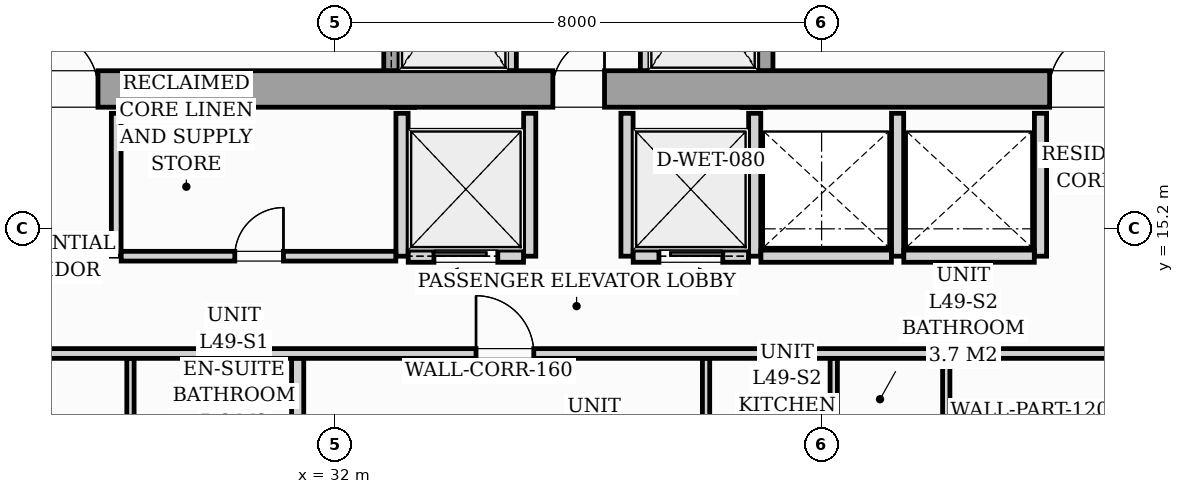
"""IFC4 building model, lengths in metres.
Left out: names, types, materials, properties, quantities, classifications, styles, units other than length and angle.
Written with IfcOpenShell. Run it as: python <this file> out.ifc"""

import sys

from ifc_helpers import new_model, si_unit, direction, frame, frame_2d, origin, origin_2d, place, context, subcontext, project, spatial, rectangle, i_section, extrude, source, transform, mapped, element, fill, save


model = new_model("IFC4")
c1 = context("Model", 3, precision=1e-05, world=origin(), true_north=direction((0.0, 1.0)))
c2 = subcontext(c1, "Body", "Model", "MODEL_VIEW")
j1 = project(units=[si_unit("LENGTHUNIT", "METRE"), si_unit("PLANEANGLEUNIT", "RADIAN")], contexts=[c1])
p1 = place(None, origin())
s1 = spatial("IfcSite", under=j1, at=p1, CompositionType="ELEMENT")
p2 = place(p1, origin())
s2 = spatial("IfcBuilding", under=s1, at=p2, CompositionType="ELEMENT")
p3 = place(p2, frame((0.0, 0.0, 173.0)))
s3 = spatial("IfcBuildingStorey", under=s2, at=p3, CompositionType="ELEMENT", Elevation=173.0)
m1 = source(origin(), c2, "Body", "SweptSolid", [
    extrude(i_section(OverallWidth=0.416, OverallDepth=0.446, WebThickness=0.039, FlangeThickness=0.063, FilletRadius=0.018, at=origin_2d()), origin(), (0.0, 0.0, 1.0), 3.196),
])
for number, where, z_axis, x_axis in (
    (1, (33.12, 17.4, 0.002), (0.0, 0.0, 1.0), (1.0, 0.0, 0.0)),
    (2, (38.88, 17.4, 0.002), (0.0, 0.0, 1.0), (1.0, 0.0, 0.0)),
):
    element("IfcColumn", number, at=place(p3, frame(where, z_axis=z_axis, x_axis=x_axis)), inside=s3, PredefinedType="PILASTER", context=c2, shape_type="MappedRepresentation", body=[
        mapped(m1, transform((0.0, 0.0, 0.0), scale=1.0)),
    ])
p4 = place(p3, frame((26.2, 17.5, 0.0), z_axis=(0.0, 0.0, 1.0), x_axis=(1.0, 0.0, 0.0)))
e3 = element("IfcWall", 3, at=p4, inside=s3, PredefinedType="SHEAR", context=c2, shape_type="SweptSolid", body=[
    extrude(rectangle(XDim=19.6, YDim=0.6, at=frame_2d((9.8, 0.0))), origin(), (0.0, 0.0, 1.0), 3.2),
])
p5 = place(p4, frame((0.95, 0.0, 0.0)))
e4 = element("IfcOpeningElement", 4, at=p5, cuts=e3, PredefinedType="OPENING", context=c2, shape_type="SweptSolid", body=[
    extrude(rectangle(XDim=0.95, YDim=2.06, at=frame_2d((0.475, 1.03))), frame((0.0, 0.31, 0.0), z_axis=(0.0, -1.0, 0.0), x_axis=(1.0, 0.0, 0.0)), (0.0, 0.0, 1.0), 0.62),
])
p6 = place(p4, frame((9.38, 0.0, 0.0)))
e5 = element("IfcOpeningElement", 5, at=p6, cuts=e3, PredefinedType="OPENING", context=c2, shape_type="SweptSolid", body=[
    extrude(rectangle(XDim=0.85, YDim=2.0, at=frame_2d((0.425, 1.0))), frame((0.0, 0.31, 0.0), z_axis=(0.0, -1.0, 0.0), x_axis=(1.0, 0.0, 0.0)), (0.0, 0.0, 1.0), 0.62),
])
p7 = place(p4, frame((17.55, 0.0, 0.0)))
e6 = element("IfcOpeningElement", 6, at=p7, cuts=e3, PredefinedType="OPENING", context=c2, shape_type="SweptSolid", body=[
    extrude(rectangle(XDim=0.95, YDim=2.06, at=frame_2d((0.475, 1.03))), frame((0.0, 0.31, 0.0), z_axis=(0.0, -1.0, 0.0), x_axis=(1.0, 0.0, 0.0)), (0.0, 0.0, 1.0), 0.62),
])
p8 = place(p3, frame((32.925, 17.802, 0.0), z_axis=(0.0, 0.0, 1.0), x_axis=(0.0, 1.0, 0.0)))
e7 = element("IfcWall", 7, at=p8, inside=s3, PredefinedType="SOLIDWALL", context=c2, shape_type="SweptSolid", body=[
    extrude(rectangle(XDim=2.646, YDim=0.25, at=frame_2d((1.323, 0.0))), origin(), (0.0, 0.0, 1.0), 3.2),
])
p9 = place(p8, frame((0.548, 0.0, 0.0)))
e8 = element("IfcOpeningElement", 8, at=p9, cuts=e7, PredefinedType="OPENING", context=c2, shape_type="SweptSolid", body=[
    extrude(rectangle(XDim=1.1, YDim=2.08, at=frame_2d((0.55, 1.04))), frame((0.0, 0.135, 0.0), z_axis=(0.0, -1.0, 0.0), x_axis=(1.0, 0.0, 0.0)), (0.0, 0.0, 1.0), 0.27),
])
for number, where, z_axis, x_axis in (
    (9, (34.9, 17.802, 0.0), (0.0, 0.0, 1.0), (0.0, 1.0, 0.0)),
    (10, (37.1, 17.802, 0.0), (0.0, 0.0, 1.0), (0.0, 1.0, 0.0)),
):
    element("IfcWall", number, at=place(p3, frame(where, z_axis=z_axis, x_axis=x_axis)), inside=s3, PredefinedType="PARTITIONING", context=c2, shape_type="SweptSolid", body=[
        extrude(rectangle(XDim=2.646, YDim=0.16, at=frame_2d((1.323, 0.0))), origin(), (0.0, 0.0, 1.0), 2.94),
    ])
p10 = place(p3, frame((39.075, 17.802, 0.0), z_axis=(0.0, 0.0, 1.0), x_axis=(0.0, 1.0, 0.0)))
e11 = element("IfcWall", 11, at=p10, inside=s3, PredefinedType="SOLIDWALL", context=c2, shape_type="SweptSolid", body=[
    extrude(rectangle(XDim=2.646, YDim=0.25, at=frame_2d((1.323, 0.0))), origin(), (0.0, 0.0, 1.0), 3.2),
])
p11 = place(p10, frame((0.548, 0.0, 0.0)))
e12 = element("IfcOpeningElement", 12, at=p11, cuts=e11, PredefinedType="OPENING", context=c2, shape_type="SweptSolid", body=[
    extrude(rectangle(XDim=1.1, YDim=2.08, at=frame_2d((0.55, 1.04))), frame((0.0, 0.135, 0.0), z_axis=(0.0, -1.0, 0.0), x_axis=(1.0, 0.0, 0.0)), (0.0, 0.0, 1.0), 0.27),
])
p12 = place(p3, frame((28.4, 14.75, 0.0), z_axis=(0.0, 0.0, 1.0), x_axis=(0.0, 1.0, 0.0)))
e13 = element("IfcWall", 13, at=p12, inside=s3, PredefinedType="PARTITIONING", context=c2, shape_type="SweptSolid", body=[
    extrude(rectangle(XDim=2.35, YDim=0.16, at=frame_2d((1.175, 0.0))), origin(), (0.0, 0.0, 1.0), 2.94),
])
p13 = place(p3, frame((33.1, 14.75, 0.0), z_axis=(0.0, 0.0, 1.0), x_axis=(0.0, 1.0, 0.0)))
e14 = element("IfcWall", 14, at=p13, inside=s3, PredefinedType="PARTITIONING", context=c2, shape_type="SweptSolid", body=[
    extrude(rectangle(XDim=2.35, YDim=0.2, at=frame_2d((1.175, 0.0))), origin(), (0.0, 0.0, 1.0), 2.94),
])
p14 = place(p3, frame((28.482, 14.75, 0.0), z_axis=(0.0, 0.0, 1.0), x_axis=(1.0, 0.0, 0.0)))
e15 = element("IfcWall", 15, at=p14, inside=s3, PredefinedType="PARTITIONING", context=c2, shape_type="SweptSolid", body=[
    extrude(rectangle(XDim=4.516, YDim=0.16, at=frame_2d((2.258, 0.0))), origin(), (0.0, 0.0, 1.0), 2.94),
])
p15 = place(p14, frame((1.868, 0.0, 0.0)))
e16 = element("IfcOpeningElement", 16, at=p15, cuts=e15, PredefinedType="OPENING", context=c2, shape_type="SweptSolid", body=[
    extrude(rectangle(XDim=0.8, YDim=2.05, at=frame_2d((0.4, 1.025))), frame((0.0, 0.09, 0.0), z_axis=(0.0, -1.0, 0.0), x_axis=(1.0, 0.0, 0.0)), (0.0, 0.0, 1.0), 0.18),
])
p16 = place(p3, frame((35.2, 14.75, 0.0), z_axis=(0.0, 0.0, 1.0), x_axis=(0.0, 1.0, 0.0)))
e17 = element("IfcWall", 17, at=p16, inside=s3, PredefinedType="PARTITIONING", context=c2, shape_type="SweptSolid", body=[
    extrude(rectangle(XDim=2.35, YDim=0.2, at=frame_2d((1.175, 0.0))), origin(), (0.0, 0.0, 1.0), 2.94),
])
p17 = place(p3, frame((33.202, 14.75, 0.0), z_axis=(0.0, 0.0, 1.0), x_axis=(1.0, 0.0, 0.0)))
e18 = element("IfcWall", 18, at=p17, inside=s3, PredefinedType="PARTITIONING", context=c2, shape_type="SweptSolid", body=[
    extrude(rectangle(XDim=1.896, YDim=0.2, at=frame_2d((0.948, 0.0))), origin(), (0.0, 0.0, 1.0), 2.94),
])
p18 = place(p17, frame((0.423, 0.0, 0.0)))
e19 = element("IfcOpeningElement", 19, at=p18, cuts=e18, PredefinedType="OPENING", context=c2, shape_type="SweptSolid", body=[
    extrude(rectangle(XDim=1.05, YDim=2.08, at=frame_2d((0.525, 1.04))), frame((0.0, 0.11, 0.0), z_axis=(0.0, -1.0, 0.0), x_axis=(1.0, 0.0, 0.0)), (0.0, 0.0, 1.0), 0.22),
])
for number, where, z_axis, x_axis in (
    (20, (36.8, 14.75, 0.0), (0.0, 0.0, 1.0), (0.0, 1.0, 0.0)),
    (21, (38.9, 14.75, 0.0), (0.0, 0.0, 1.0), (0.0, 1.0, 0.0)),
):
    element("IfcWall", number, at=place(p3, frame(where, z_axis=z_axis, x_axis=x_axis)), inside=s3, PredefinedType="PARTITIONING", context=c2, shape_type="SweptSolid", body=[
        extrude(rectangle(XDim=2.35, YDim=0.2, at=frame_2d((1.175, 0.0))), origin(), (0.0, 0.0, 1.0), 2.94),
    ])
p19 = place(p3, frame((36.902, 14.75, 0.0), z_axis=(0.0, 0.0, 1.0), x_axis=(1.0, 0.0, 0.0)))
e22 = element("IfcWall", 22, at=p19, inside=s3, PredefinedType="PARTITIONING", context=c2, shape_type="SweptSolid", body=[
    extrude(rectangle(XDim=1.896, YDim=0.2, at=frame_2d((0.948, 0.0))), origin(), (0.0, 0.0, 1.0), 2.94),
])
p20 = place(p19, frame((0.423, 0.0, 0.0)))
e23 = element("IfcOpeningElement", 23, at=p20, cuts=e22, PredefinedType="OPENING", context=c2, shape_type="SweptSolid", body=[
    extrude(rectangle(XDim=1.05, YDim=2.08, at=frame_2d((0.525, 1.04))), frame((0.0, 0.11, 0.0), z_axis=(0.0, -1.0, 0.0), x_axis=(1.0, 0.0, 0.0)), (0.0, 0.0, 1.0), 0.22),
])
for number, where, z_axis, x_axis in (
    (24, (41.25, 14.75, 0.0), (0.0, 0.0, 1.0), (0.0, 1.0, 0.0)),
    (25, (43.6, 14.75, 0.0), (0.0, 0.0, 1.0), (0.0, 1.0, 0.0)),
):
    element("IfcWall", number, at=place(p3, frame(where, z_axis=z_axis, x_axis=x_axis)), inside=s3, PredefinedType="PARTITIONING", context=c2, shape_type="SweptSolid", body=[
        extrude(rectangle(XDim=2.35, YDim=0.2, at=frame_2d((1.175, 0.0))), origin(), (0.0, 0.0, 1.0), 2.94),
    ])
for number, where, z_axis, x_axis in (
    (26, (39.002, 14.75, 0.0), (0.0, 0.0, 1.0), (1.0, 0.0, 0.0)),
    (27, (41.352, 14.75, 0.0), (0.0, 0.0, 1.0), (1.0, 0.0, 0.0)),
):
    element("IfcWall", number, at=place(p3, frame(where, z_axis=z_axis, x_axis=x_axis)), inside=s3, PredefinedType="PARTITIONING", context=c2, shape_type="SweptSolid", body=[
        extrude(rectangle(XDim=2.146, YDim=0.2, at=frame_2d((1.073, 0.0))), origin(), (0.0, 0.0, 1.0), 2.94),
    ])
p21 = place(p3, frame((22.6, 13.15, 0.0), z_axis=(0.0, 0.0, 1.0), x_axis=(1.0, 0.0, 0.0)))
e28 = element("IfcWall", 28, at=p21, inside=s3, PredefinedType="PARTITIONING", context=c2, shape_type="SweptSolid", body=[
    extrude(rectangle(XDim=23.28, YDim=0.16, at=frame_2d((11.64, 0.0))), origin(), (0.0, 0.0, 1.0), 2.94),
])
p22 = place(p21, frame((0.607, 0.0, 0.0)))
e29 = element("IfcOpeningElement", 29, at=p22, cuts=e28, PredefinedType="OPENING", context=c2, shape_type="SweptSolid", body=[
    extrude(rectangle(XDim=0.95, YDim=2.06, at=frame_2d((0.475, 1.03))), frame((0.0, 0.09, 0.0), z_axis=(0.0, -1.0, 0.0), x_axis=(1.0, 0.0, 0.0)), (0.0, 0.0, 1.0), 0.18),
])
p23 = place(p21, frame((11.717, 0.0, 0.0)))
e30 = element("IfcOpeningElement", 30, at=p23, cuts=e28, PredefinedType="OPENING", context=c2, shape_type="SweptSolid", body=[
    extrude(rectangle(XDim=0.95, YDim=2.06, at=frame_2d((0.475, 1.03))), frame((0.0, 0.09, 0.0), z_axis=(0.0, -1.0, 0.0), x_axis=(1.0, 0.0, 0.0)), (0.0, 0.0, 1.0), 0.18),
])
p24 = place(p3, frame((28.634, 7.503, 0.0), z_axis=(0.0, 0.0, 1.0), x_axis=(0.0, 1.0, 0.0)))
e31 = element("IfcWall", 31, at=p24, inside=s3, PredefinedType="PARTITIONING", context=c2, shape_type="SweptSolid", body=[
    extrude(rectangle(XDim=5.565, YDim=0.12, at=frame_2d((2.782, 0.0))), origin(), (0.0, 0.0, 1.0), 2.94),
])
p25 = place(p24, frame((2.297, 0.0, 0.0)))
e32 = element("IfcOpeningElement", 32, at=p25, cuts=e31, PredefinedType="OPENING", context=c2, shape_type="SweptSolid", body=[
    extrude(rectangle(XDim=0.9, YDim=2.05, at=frame_2d((0.45, 1.025))), frame((0.0, 0.07, 0.0), z_axis=(0.0, -1.0, 0.0), x_axis=(1.0, 0.0, 0.0)), (0.0, 0.0, 1.0), 0.14),
])
p26 = place(p3, frame((31.384, 10.912, 0.0), z_axis=(0.0, 0.0, 1.0), x_axis=(0.0, 1.0, 0.0)))
e33 = element("IfcWall", 33, at=p26, inside=s3, PredefinedType="PARTITIONING", context=c2, shape_type="SweptSolid", body=[
    extrude(rectangle(XDim=2.156, YDim=0.2, at=frame_2d((1.078, 0.0))), origin(), (0.0, 0.0, 1.0), 2.94),
])
p27 = place(p3, frame((42.05, 8.612, 0.0), z_axis=(0.0, 0.0, 1.0), x_axis=(0.0, 1.0, 0.0)))
e34 = element("IfcWall", 34, at=p27, inside=s3, PredefinedType="PARTITIONING", context=c2, shape_type="SweptSolid", body=[
    extrude(rectangle(XDim=4.456, YDim=0.12, at=frame_2d((2.228, 0.0))), origin(), (0.0, 0.0, 1.0), 2.94),
])
p28 = place(p27, frame((2.386, 0.0, 0.0)))
e35 = element("IfcOpeningElement", 35, at=p28, cuts=e34, PredefinedType="OPENING", context=c2, shape_type="SweptSolid", body=[
    extrude(rectangle(XDim=0.9, YDim=2.05, at=frame_2d((0.45, 1.025))), frame((0.0, 0.07, 0.0), z_axis=(0.0, -1.0, 0.0), x_axis=(1.0, 0.0, 0.0)), (0.0, 0.0, 1.0), 0.14),
])
for number, where, z_axis, x_axis in (
    (36, (40.2, 10.962, 0.0), (0.0, 0.0, 1.0), (0.0, 1.0, 0.0)),
    (37, (38.1, 10.962, 0.0), (0.0, 0.0, 1.0), (0.0, 1.0, 0.0)),
):
    element("IfcWall", number, at=place(p3, frame(where, z_axis=z_axis, x_axis=x_axis)), inside=s3, PredefinedType="PARTITIONING", context=c2, shape_type="SweptSolid", body=[
        extrude(rectangle(XDim=2.106, YDim=0.12, at=frame_2d((1.053, 0.0))), origin(), (0.0, 0.0, 1.0), 2.94),
    ])
m2 = source(origin(), c2, "Body", "SweptSolid", [
    extrude(rectangle(XDim=0.95, YDim=2.06, at=frame_2d((0.475, 1.03))), frame((0.0, 0.025, 0.0), z_axis=(0.0, -1.0, 0.0), x_axis=(1.0, 0.0, 0.0)), (0.0, 0.0, 1.0), 0.05),
])
p29 = place(p5, origin())
e38 = element("IfcDoor", 38, at=p29, inside=s3, OperationType="SINGLE_SWING_LEFT", PredefinedType="DOOR", context=c2, shape_type="MappedRepresentation", body=[
    mapped(m2, transform((0.0, 0.0, 0.0), scale=1.0)),
])
fill(e4, e38)
m3 = source(origin(), c2, "Body", "SweptSolid", [
    extrude(rectangle(XDim=0.85, YDim=2.0, at=frame_2d((0.425, 1.0))), frame((0.0, 0.025, 0.0), z_axis=(0.0, -1.0, 0.0), x_axis=(1.0, 0.0, 0.0)), (0.0, 0.0, 1.0), 0.05),
])
p30 = place(p6, origin())
e39 = element("IfcDoor", 39, at=p30, inside=s3, OperationType="SINGLE_SWING_RIGHT", PredefinedType="DOOR", context=c2, shape_type="MappedRepresentation", body=[
    mapped(m3, transform((0.0, 0.0, 0.0), scale=1.0)),
])
fill(e5, e39)
p31 = place(p7, origin())
e40 = element("IfcDoor", 40, at=p31, inside=s3, OperationType="SINGLE_SWING_RIGHT", PredefinedType="DOOR", context=c2, shape_type="MappedRepresentation", body=[
    mapped(m2, transform((0.0, 0.0, 0.0), scale=1.0)),
])
fill(e6, e40)
m4 = source(origin(), c2, "Body", "SweptSolid", [
    extrude(rectangle(XDim=0.8, YDim=2.05, at=frame_2d((0.4, 1.025))), frame((0.0, 0.025, 0.0), z_axis=(0.0, -1.0, 0.0), x_axis=(1.0, 0.0, 0.0)), (0.0, 0.0, 1.0), 0.05),
])
p32 = place(p15, origin())
e41 = element("IfcDoor", 41, at=p32, inside=s3, OperationType="SINGLE_SWING_RIGHT", PredefinedType="DOOR", context=c2, shape_type="MappedRepresentation", body=[
    mapped(m4, transform((0.0, 0.0, 0.0), scale=1.0)),
])
fill(e16, e41)
m5 = source(origin(), c2, "Body", "SweptSolid", [
    extrude(rectangle(XDim=1.05, YDim=2.08, at=frame_2d((0.525, 1.04))), frame((0.0, 0.025, 0.0), z_axis=(0.0, -1.0, 0.0), x_axis=(1.0, 0.0, 0.0)), (0.0, 0.0, 1.0), 0.05),
])
p33 = place(p18, origin())
e42 = element("IfcDoor", 42, at=p33, inside=s3, OperationType="SLIDING_TO_LEFT", PredefinedType="DOOR", context=c2, shape_type="MappedRepresentation", body=[
    mapped(m5, transform((0.0, 0.0, 0.0), scale=1.0)),
])
fill(e19, e42)
p34 = place(p20, origin())
e43 = element("IfcDoor", 43, at=p34, inside=s3, OperationType="SLIDING_TO_RIGHT", PredefinedType="DOOR", context=c2, shape_type="MappedRepresentation", body=[
    mapped(m5, transform((0.0, 0.0, 0.0), scale=1.0)),
])
fill(e23, e43)
m6 = source(origin(), c2, "Body", "SweptSolid", [
    extrude(rectangle(XDim=0.95, YDim=2.06, at=frame_2d((0.475, 1.03))), frame((0.0, 0.025, 0.0), z_axis=(0.0, -1.0, 0.0), x_axis=(1.0, 0.0, 0.0)), (0.0, 0.0, 1.0), 0.05),
])
p35 = place(p23, origin())
e44 = element("IfcDoor", 44, at=p35, inside=s3, OperationType="SINGLE_SWING_LEFT", PredefinedType="DOOR", context=c2, shape_type="MappedRepresentation", body=[
    mapped(m6, transform((0.0, 0.0, 0.0), scale=1.0)),
])
fill(e30, e44)
save(model, sys.argv[1])
